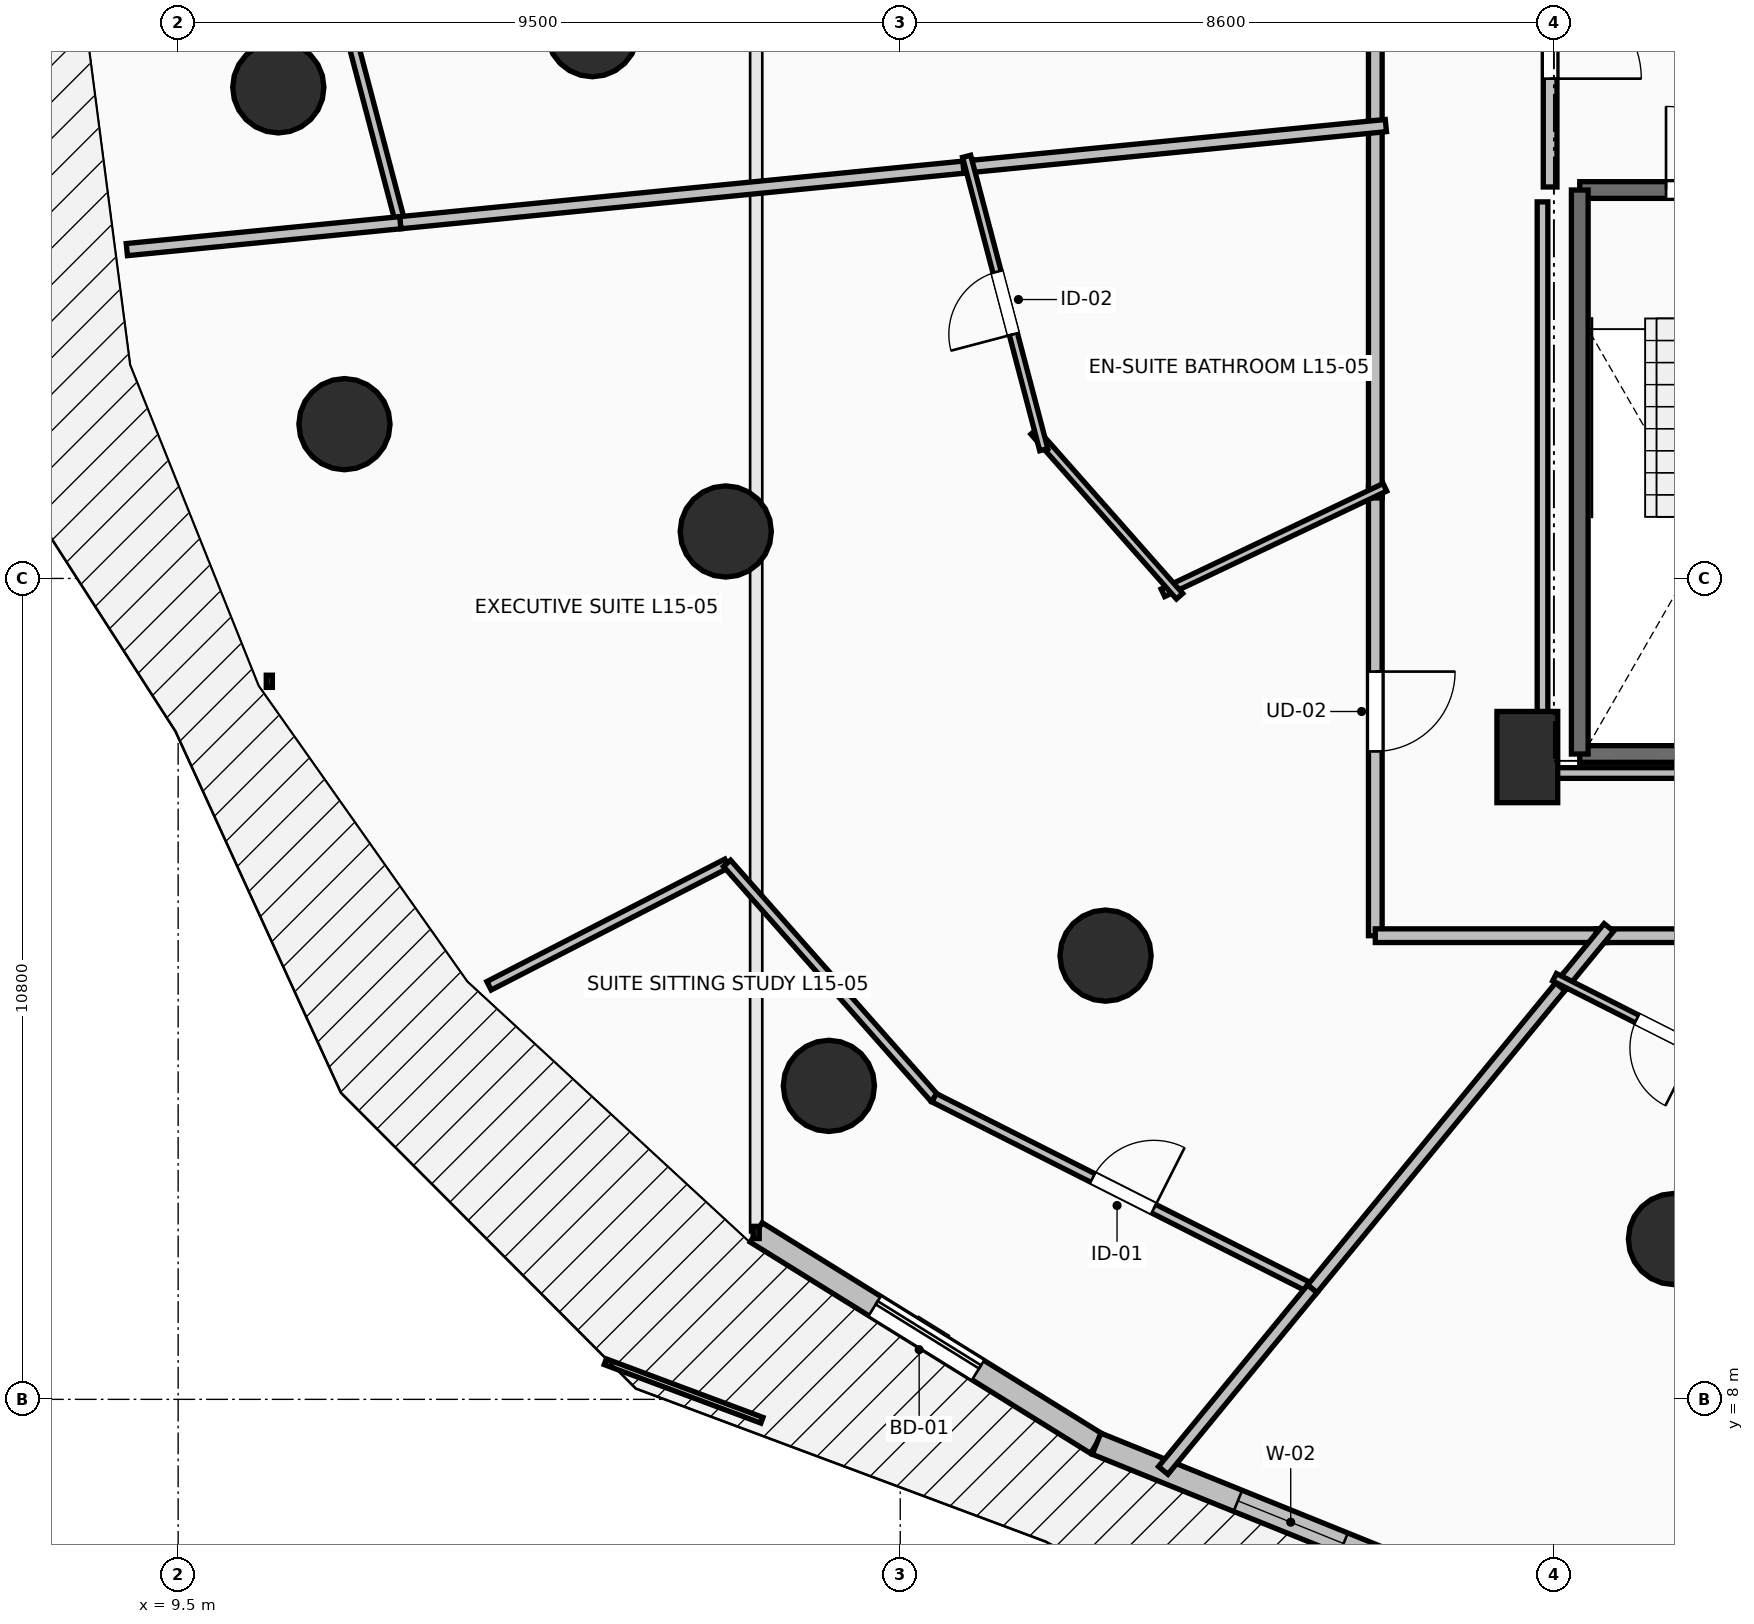
"""IFC4 building model, lengths in metres.
Left out: names, types, materials, properties, quantities, classifications, styles, units other than length and angle.
Written with IfcOpenShell. Run it as: python <this file> out.ifc"""

import sys

from ifc_helpers import new_model, si_unit, direction, frame, frame_2d, origin, origin_2d, place, context, subcontext, project, spatial, rectangle, circle, extrude, element, fill, save


model = new_model("IFC4")
c1 = context("Model", 3, precision=1e-05, world=origin(), true_north=direction((0.0, 1.0)))
c2 = subcontext(c1, "Body", "Model", "MODEL_VIEW")
j1 = project(units=[si_unit("LENGTHUNIT", "METRE"), si_unit("PLANEANGLEUNIT", "RADIAN")], contexts=[c1])
p1 = place(None, origin())
s1 = spatial("IfcSite", under=j1, at=p1, CompositionType="ELEMENT")
p2 = place(p1, origin())
s2 = spatial("IfcBuilding", under=s1, at=p2, CompositionType="ELEMENT")
p3 = place(p2, frame((0.0, 0.0, 59.0)))
s3 = spatial("IfcBuildingStorey", under=s2, at=p3, CompositionType="ELEMENT", Elevation=59.0)
for number, where, z_axis, x_axis in (
    (1, (14.95, 26.0, 0.0), (0.0, 0.0, 1.0), (-1.0, 0.0, 0.0)),
    (2, (16.705, 19.418, 0.0), (0.0, 0.0, 1.0), (-0.924, -0.383, 0.0)),
    (3, (21.701, 13.838, 0.0), (0.0, 0.0, 1.0), (-0.707, -0.707, 0.0)),
    (4, (29.179, 10.109, 0.0), (0.0, 0.0, 1.0), (-0.383, -0.924, 0.0)),
    (5, (10.818, 25.261, 0.0), (0.0, 0.0, 1.0), (-1.0, 0.0, 0.0)),
    (6, (11.688, 20.83, 0.0), (0.0, 0.0, 1.0), (-0.924, -0.383, 0.0)),
    (7, (18.061, 12.124, 0.0), (0.0, 0.0, 1.0), (-0.707, -0.707, 0.0)),
):
    element("IfcColumn", number, at=place(p3, frame(where, z_axis=z_axis, x_axis=x_axis)), inside=s3, PredefinedType="COLUMN", context=c2, shape_type="SweptSolid", body=[
        extrude(circle(Radius=0.6, at=origin_2d()), origin(), (0.0, 0.0, 1.0), 3.5),
    ])
p4 = place(p3, frame((27.25, 16.45, 0.0), z_axis=(0.0, 0.0, 1.0), x_axis=(1.0, 0.0, 0.0)))
e8 = element("IfcColumn", 8, at=p4, inside=s3, PredefinedType="PILASTER", context=c2, shape_type="SweptSolid", body=[
    extrude(rectangle(XDim=0.8, YDim=1.2, at=origin_2d()), origin(), (0.0, 0.0, 1.0), 3.5),
])
p5 = place(p3, frame((17.105, 10.196, 0.0), z_axis=(0.0, 0.0, 1.0), x_axis=(0.849633724826, -0.527373239404, 0.0)))
e9 = element("IfcWall", 9, at=p5, inside=s3, PredefinedType="STANDARD", context=c2, shape_type="SweptSolid", body=[
    extrude(rectangle(XDim=5.271, YDim=0.3, at=frame_2d((2.635, 0.0))), origin(), (0.0, 0.0, 1.0), 3.24),
])
p6 = place(p5, frame((1.835, 0.0, 0.0)))
e10 = element("IfcOpeningElement", 10, at=p6, cuts=e9, PredefinedType="OPENING", context=c2, shape_type="SweptSolid", body=[
    extrude(rectangle(XDim=1.6, YDim=2.3, at=frame_2d((0.8, 1.15))), frame((0.0, 0.165, 0.0), z_axis=(0.0, -1.0, 0.0), x_axis=(1.0, 0.0, 0.0)), (0.0, 0.0, 1.0), 0.33),
])
p7 = place(p3, frame((21.583, 7.417, 0.0), z_axis=(0.0, 0.0, 1.0), x_axis=(0.927095325176, -0.374825636845, 0.0)))
e11 = element("IfcWall", 11, at=p7, inside=s3, PredefinedType="STANDARD", context=c2, shape_type="SweptSolid", body=[
    extrude(rectangle(XDim=5.51, YDim=0.3, at=frame_2d((2.755, 0.0))), origin(), (0.0, 0.0, 1.0), 3.24),
])
p8 = place(p7, frame((2.005, 0.0, 0.85)))
e12 = element("IfcOpeningElement", 12, at=p8, cuts=e11, PredefinedType="OPENING", context=c2, shape_type="SweptSolid", body=[
    extrude(rectangle(XDim=1.5, YDim=2.19, at=frame_2d((0.75, 1.095))), frame((0.0, 0.165, 0.0), z_axis=(0.0, -1.0, 0.0), x_axis=(1.0, 0.0, 0.0)), (0.0, 0.0, 1.0), 0.33),
])
p9 = place(p3, frame((27.94, 23.91, 0.0), z_axis=(0.0, 0.0, 1.0), x_axis=(1.0, 0.0, 0.0)))
e13 = element("IfcWall", 13, at=p9, inside=s3, PredefinedType="SOLIDWALL", context=c2, shape_type="SweptSolid", body=[
    extrude(rectangle(XDim=3.37, YDim=0.22, at=frame_2d((1.685, 0.0))), origin(), (0.0, 0.0, 1.0), 3.24),
])
p10 = place(p9, frame((1.135, 0.0, 0.0)))
e14 = element("IfcOpeningElement", 14, at=p10, cuts=e13, PredefinedType="OPENING", context=c2, shape_type="SweptSolid", body=[
    extrude(rectangle(XDim=1.1, YDim=2.15, at=frame_2d((0.55, 1.075))), frame((0.0, 0.125, 0.0), z_axis=(0.0, -1.0, 0.0), x_axis=(1.0, 0.0, 0.0)), (0.0, 0.0, 1.0), 0.25),
])
p11 = place(p3, frame((31.31, 16.49, 0.0), z_axis=(0.0, 0.0, 1.0), x_axis=(-1.0, 0.0, 0.0)))
e15 = element("IfcWall", 15, at=p11, inside=s3, PredefinedType="SOLIDWALL", context=c2, shape_type="SweptSolid", body=[
    extrude(rectangle(XDim=3.37, YDim=0.22, at=frame_2d((1.685, 0.0))), origin(), (0.0, 0.0, 1.0), 3.24),
])
p12 = place(p3, frame((27.94, 16.49, 0.0), z_axis=(0.0, 0.0, 1.0), x_axis=(0.0, 1.0, 0.0)))
e16 = element("IfcWall", 16, at=p12, inside=s3, PredefinedType="SOLIDWALL", context=c2, shape_type="SweptSolid", body=[
    extrude(rectangle(XDim=7.42, YDim=0.22, at=frame_2d((3.71, 0.0))), origin(), (0.0, 0.0, 1.0), 3.24),
])
p13 = place(p3, frame((27.55, 28.0, 0.0), z_axis=(0.0, 0.0, 1.0), x_axis=(0.0, -1.0, 0.0)))
e17 = element("IfcWall", 17, at=p13, inside=s3, PredefinedType="PARTITIONING", context=c2, shape_type="SweptSolid", body=[
    extrude(rectangle(XDim=4.05, YDim=0.18, at=frame_2d((2.025, 0.0))), origin(), (0.0, 0.0, 1.0), 3.24),
])
p14 = place(p13, frame((1.425, 0.0, 0.0)))
e18 = element("IfcOpeningElement", 18, at=p14, cuts=e17, PredefinedType="OPENING", context=c2, shape_type="SweptSolid", body=[
    extrude(rectangle(XDim=1.2, YDim=2.15, at=frame_2d((0.6, 1.075))), frame((0.0, 0.105, 0.0), z_axis=(0.0, -1.0, 0.0), x_axis=(1.0, 0.0, 0.0)), (0.0, 0.0, 1.0), 0.21),
])
p15 = place(p3, frame((25.25, 30.598, 0.0), z_axis=(0.0, 0.0, 1.0), x_axis=(0.0, -1.0, 0.0)))
e19 = element("IfcWall", 19, at=p15, inside=s3, PredefinedType="PARTITIONING", context=c2, shape_type="SweptSolid", body=[
    extrude(rectangle(XDim=5.914, YDim=0.18, at=frame_2d((2.957, 0.0))), origin(), (0.0, 0.0, 1.0), 2.432),
])
p16 = place(p15, frame((2.432, 0.0, 0.0)))
e20 = element("IfcOpeningElement", 20, at=p16, cuts=e19, PredefinedType="OPENING", context=c2, shape_type="SweptSolid", body=[
    extrude(rectangle(XDim=1.05, YDim=2.2, at=frame_2d((0.525, 1.1))), frame((0.0, 0.105, 0.0), z_axis=(0.0, -1.0, 0.0), x_axis=(1.0, 0.0, 0.0)), (0.0, 0.0, 1.0), 0.21),
])
p17 = place(p3, frame((25.25, 19.999, 0.0), z_axis=(0.0, 0.0, 1.0), x_axis=(0.0, -1.0, 0.0)))
e21 = element("IfcWall", 21, at=p17, inside=s3, PredefinedType="PARTITIONING", context=c2, shape_type="SweptSolid", body=[
    extrude(rectangle(XDim=5.899, YDim=0.18, at=frame_2d((2.949, 0.0))), origin(), (0.0, 0.0, 1.0), 2.432),
])
p18 = place(p17, frame((2.425, 0.0, 0.0)))
e22 = element("IfcOpeningElement", 22, at=p18, cuts=e21, PredefinedType="OPENING", context=c2, shape_type="SweptSolid", body=[
    extrude(rectangle(XDim=1.05, YDim=2.2, at=frame_2d((0.525, 1.1))), frame((0.0, 0.105, 0.0), z_axis=(0.0, -1.0, 0.0), x_axis=(1.0, 0.0, 0.0)), (0.0, 0.0, 1.0), 0.21),
])
p19 = place(p3, frame((25.25, 14.1, 0.0), z_axis=(0.0, 0.0, 1.0), x_axis=(1.0, 0.0, 0.0)))
e23 = element("IfcWall", 23, at=p19, inside=s3, PredefinedType="PARTITIONING", context=c2, shape_type="SweptSolid", body=[
    extrude(rectangle(XDim=3.044, YDim=0.18, at=frame_2d((1.522, 0.0))), origin(), (0.0, 0.0, 1.0), 2.432),
])
p20 = place(p3, frame((25.25, 24.824, 0.0), z_axis=(0.0, 0.0, 1.0), x_axis=(0.0, -1.0, 0.0)))
e24 = element("IfcWall", 24, at=p20, inside=s3, PredefinedType="PARTITIONING", context=c2, shape_type="SweptSolid", body=[
    extrude(rectangle(XDim=4.965, YDim=0.18, at=frame_2d((2.482, 0.0))), origin(), (0.0, 0.0, 1.0), 3.24),
])
p21 = place(p3, frame((28.154, 14.1, 0.0), z_axis=(0.0, 0.0, 1.0), x_axis=(1.0, 0.0, 0.0)))
e25 = element("IfcWall", 25, at=p21, inside=s3, PredefinedType="PARTITIONING", context=c2, shape_type="SweptSolid", body=[
    extrude(rectangle(XDim=5.69, YDim=0.18, at=frame_2d((2.845, 0.0))), origin(), (0.0, 0.0, 1.0), 2.432),
])
p22 = place(p3, frame((11.76, 26.0, 0.0), z_axis=(0.0, 0.0, 1.0), x_axis=(0.254465628682, -0.967081818576, 0.0)))
e26 = element("IfcWall", 26, at=p22, inside=s3, PredefinedType="PARTITIONING", context=c2, shape_type="SweptSolid", body=[
    extrude(rectangle(XDim=2.606, YDim=0.125, at=frame_2d((1.303, 0.0))), origin(), (0.0, 0.0, 1.0), 2.432),
])
p23 = place(p3, frame((12.423, 23.48, 0.0), z_axis=(0.0, 0.0, 1.0), x_axis=(0.995173937517, 0.098126622721, 0.0)))
e27 = element("IfcWall", 27, at=p23, inside=s3, PredefinedType="PARTITIONING", context=c2, shape_type="SweptSolid", body=[
    extrude(rectangle(XDim=7.583, YDim=0.16, at=frame_2d((3.792, 0.0))), origin(), (0.0, 0.0, 1.0), 2.886),
])
p24 = place(p3, frame((19.831, 24.21, 0.0), z_axis=(0.0, 0.0, 1.0), x_axis=(0.995182391057, 0.098040851333, 0.0)))
e28 = element("IfcWall", 28, at=p24, inside=s3, PredefinedType="PARTITIONING", context=c2, shape_type="SweptSolid", body=[
    extrude(rectangle(XDim=5.585, YDim=0.16, at=frame_2d((2.793, 0.0))), origin(), (0.0, 0.0, 1.0), 2.929),
])
p25 = place(p3, frame((8.825, 23.126, 0.0), z_axis=(0.0, 0.0, 1.0), x_axis=(0.995195038103, 0.097912390097, 0.0)))
e29 = element("IfcWall", 29, at=p25, inside=s3, PredefinedType="PARTITIONING", context=c2, shape_type="SweptSolid", body=[
    extrude(rectangle(XDim=3.615, YDim=0.16, at=frame_2d((1.808, 0.0))), origin(), (0.0, 0.0, 1.0), 2.624),
])
p26 = place(p3, frame((25.376, 19.999, 0.0), z_axis=(0.0, 0.0, 1.0), x_axis=(-0.903186785932, -0.429247748647, 0.0)))
e30 = element("IfcWall", 30, at=p26, inside=s3, PredefinedType="PARTITIONING", context=c2, shape_type="SweptSolid", body=[
    extrude(rectangle(XDim=3.234, YDim=0.11, at=frame_2d((1.617, 0.0))), origin(), (0.0, 0.0, 1.0), 2.929),
])
p27 = place(p3, frame((22.675, 18.566, 0.0), z_axis=(0.0, 0.0, 1.0), x_axis=(-0.661981720099, 0.749519981224, 0.0)))
e31 = element("IfcWall", 31, at=p27, inside=s3, PredefinedType="PARTITIONING", context=c2, shape_type="SweptSolid", body=[
    extrude(rectangle(XDim=2.892, YDim=0.11, at=frame_2d((1.446, 0.0))), origin(), (0.0, 0.0, 1.0), 2.929),
])
p28 = place(p3, frame((20.889, 20.494, 0.0), z_axis=(0.0, 0.0, 1.0), x_axis=(-0.254405980461, 0.967097511684, 0.0)))
e32 = element("IfcWall", 32, at=p28, inside=s3, PredefinedType="PARTITIONING", context=c2, shape_type="SweptSolid", body=[
    extrude(rectangle(XDim=3.991, YDim=0.11, at=frame_2d((1.996, 0.0))), origin(), (0.0, 0.0, 1.0), 3.24),
])
p29 = place(p28, frame((1.571, 0.0, 0.0)))
e33 = element("IfcOpeningElement", 33, at=p29, cuts=e32, PredefinedType="OPENING", context=c2, shape_type="SweptSolid", body=[
    extrude(rectangle(XDim=0.85, YDim=2.1, at=frame_2d((0.425, 1.05))), frame((0.0, 0.07, 0.0), z_axis=(0.0, -1.0, 0.0), x_axis=(1.0, 0.0, 0.0)), (0.0, 0.0, 1.0), 0.14),
])
p30 = place(p3, frame((13.59, 13.441, 0.0), z_axis=(0.0, 0.0, 1.0), x_axis=(0.889180616302, 0.457556369852, 0.0)))
e34 = element("IfcWall", 34, at=p30, inside=s3, PredefinedType="PARTITIONING", context=c2, shape_type="SweptSolid", body=[
    extrude(rectangle(XDim=3.521, YDim=0.125, at=frame_2d((1.76, 0.0))), origin(), (0.0, 0.0, 1.0), 2.624),
])
p31 = place(p3, frame((16.721, 15.052, 0.0), z_axis=(0.0, 0.0, 1.0), x_axis=(0.662159063844, -0.749363312532, 0.0)))
e35 = element("IfcWall", 35, at=p31, inside=s3, PredefinedType="PARTITIONING", context=c2, shape_type="SweptSolid", body=[
    extrude(rectangle(XDim=4.115, YDim=0.125, at=frame_2d((2.058, 0.0))), origin(), (0.0, 0.0, 1.0), 2.432),
])
p32 = place(p3, frame((19.446, 11.968, 0.0), z_axis=(0.0, 0.0, 1.0), x_axis=(0.892518178955, -0.451011419184, 0.0)))
e36 = element("IfcWall", 36, at=p32, inside=s3, PredefinedType="PARTITIONING", context=c2, shape_type="SweptSolid", body=[
    extrude(rectangle(XDim=5.574, YDim=0.125, at=frame_2d((2.787, 0.0))), origin(), (0.0, 0.0, 1.0), 3.24),
])
p33 = place(p32, frame((2.337, 0.0, 0.0)))
e37 = element("IfcOpeningElement", 37, at=p33, cuts=e36, PredefinedType="OPENING", context=c2, shape_type="SweptSolid", body=[
    extrude(rectangle(XDim=0.9, YDim=2.1, at=frame_2d((0.45, 1.05))), frame((0.0, 0.077, 0.0), z_axis=(0.0, -1.0, 0.0), x_axis=(1.0, 0.0, 0.0)), (0.0, 0.0, 1.0), 0.155),
])
p34 = place(p3, frame((24.421, 9.454, 0.0), z_axis=(0.0, 0.0, 1.0), x_axis=(0.634420016008, 0.772988514332, 0.0)))
e38 = element("IfcWall", 38, at=p34, inside=s3, PredefinedType="PARTITIONING", context=c2, shape_type="SweptSolid", body=[
    extrude(rectangle(XDim=5.282, YDim=0.16, at=frame_2d((2.641, 0.0))), origin(), (0.0, 0.0, 1.0), 2.886),
])
p35 = place(p3, frame((27.683, 13.429, 0.0), z_axis=(0.0, 0.0, 1.0), x_axis=(0.634186727441, 0.77317992391, 0.0)))
e39 = element("IfcWall", 39, at=p35, inside=s3, PredefinedType="PARTITIONING", context=c2, shape_type="SweptSolid", body=[
    extrude(rectangle(XDim=1.008, YDim=0.16, at=frame_2d((0.504, 0.0))), origin(), (0.0, 0.0, 1.0), 2.432),
])
p36 = place(p3, frame((22.46, 7.065, 0.0), z_axis=(0.0, 0.0, 1.0), x_axis=(0.634432805544, 0.772978017313, 0.0)))
e40 = element("IfcWall", 40, at=p36, inside=s3, PredefinedType="PARTITIONING", context=c2, shape_type="SweptSolid", body=[
    extrude(rectangle(XDim=3.091, YDim=0.16, at=frame_2d((1.545, 0.0))), origin(), (0.0, 0.0, 1.0), 2.624),
])
p37 = place(p3, frame((30.533, 12.075, 0.0), z_axis=(0.0, 0.0, 1.0), x_axis=(-0.892451870397, 0.451142614952, 0.0)))
e41 = element("IfcWall", 41, at=p37, inside=s3, PredefinedType="PARTITIONING", context=c2, shape_type="SweptSolid", body=[
    extrude(rectangle(XDim=3.277, YDim=0.11, at=frame_2d((1.639, 0.0))), origin(), (0.0, 0.0, 1.0), 2.432),
])
p38 = place(p37, frame((1.214, 0.0, 0.0)))
e42 = element("IfcOpeningElement", 42, at=p38, cuts=e41, PredefinedType="OPENING", context=c2, shape_type="SweptSolid", body=[
    extrude(rectangle(XDim=0.85, YDim=2.1, at=frame_2d((0.425, 1.05))), frame((0.0, 0.07, 0.0), z_axis=(0.0, -1.0, 0.0), x_axis=(1.0, 0.0, 0.0)), (0.0, 0.0, 1.0), 0.14),
])
p39 = place(p3, frame((31.195, 16.24, 0.0), z_axis=(0.0, 0.0, 1.0), x_axis=(-1.0, 0.0, 0.0)))
e43 = element("IfcWall", 43, at=p39, inside=s3, PredefinedType="PARTITIONING", context=c2, shape_type="SweptSolid", body=[
    extrude(rectangle(XDim=3.745, YDim=0.14, at=frame_2d((1.873, 0.0))), origin(), (0.0, 0.0, 1.0), 2.432),
])
p40 = place(p3, frame((27.45, 16.24, 0.0), z_axis=(0.0, 0.0, 1.0), x_axis=(0.0, 1.0, 0.0)))
e44 = element("IfcWall", 44, at=p40, inside=s3, PredefinedType="PARTITIONING", context=c2, shape_type="SweptSolid", body=[
    extrude(rectangle(XDim=7.514, YDim=0.14, at=frame_2d((3.757, 0.0))), origin(), (0.0, 0.0, 1.0), 2.432),
])
p41 = place(p6, origin())
e45 = element("IfcDoor", 45, at=p41, inside=s3, OperationType="SLIDING_TO_LEFT", PredefinedType="DOOR", context=c2, shape_type="SweptSolid", body=[
    extrude(rectangle(XDim=1.6, YDim=2.3, at=frame_2d((0.8, 1.15))), frame((0.0, 0.025, 0.0), z_axis=(0.0, -1.0, 0.0), x_axis=(1.0, 0.0, 0.0)), (0.0, 0.0, 1.0), 0.05),
])
fill(e10, e45)
p42 = place(p8, origin())
e46 = element("IfcWindow", 46, at=p42, inside=s3, PartitioningType="SINGLE_PANEL", PredefinedType="WINDOW", context=c2, shape_type="SweptSolid", body=[
    extrude(rectangle(XDim=1.5, YDim=2.19, at=frame_2d((0.75, 1.095))), frame((0.0, 0.03, 0.0), z_axis=(0.0, -1.0, 0.0), x_axis=(1.0, 0.0, 0.0)), (0.0, 0.0, 1.0), 0.06),
])
fill(e12, e46)
p43 = place(p10, origin())
e47 = element("IfcDoor", 47, at=p43, inside=s3, OperationType="SINGLE_SWING_LEFT", PredefinedType="DOOR", context=c2, shape_type="SweptSolid", body=[
    extrude(rectangle(XDim=1.1, YDim=2.15, at=frame_2d((0.55, 1.075))), frame((0.0, 0.025, 0.0), z_axis=(0.0, -1.0, 0.0), x_axis=(1.0, 0.0, 0.0)), (0.0, 0.0, 1.0), 0.05),
])
fill(e14, e47)
p44 = place(p14, origin())
e48 = element("IfcDoor", 48, at=p44, inside=s3, OperationType="SINGLE_SWING_RIGHT", PredefinedType="DOOR", context=c2, shape_type="SweptSolid", body=[
    extrude(rectangle(XDim=1.2, YDim=2.15, at=frame_2d((0.6, 1.075))), frame((0.0, 0.025, 0.0), z_axis=(0.0, -1.0, 0.0), x_axis=(1.0, 0.0, 0.0)), (0.0, 0.0, 1.0), 0.05),
])
fill(e18, e48)
p45 = place(p18, origin())
e49 = element("IfcDoor", 49, at=p45, inside=s3, OperationType="SINGLE_SWING_LEFT", PredefinedType="DOOR", context=c2, shape_type="SweptSolid", body=[
    extrude(rectangle(XDim=1.05, YDim=2.2, at=frame_2d((0.525, 1.1))), frame((0.0, 0.025, 0.0), z_axis=(0.0, -1.0, 0.0), x_axis=(1.0, 0.0, 0.0)), (0.0, 0.0, 1.0), 0.05),
])
fill(e22, e49)
p46 = place(p29, origin())
e50 = element("IfcDoor", 50, at=p46, inside=s3, OperationType="SINGLE_SWING_LEFT", PredefinedType="DOOR", context=c2, shape_type="SweptSolid", body=[
    extrude(rectangle(XDim=0.85, YDim=2.1, at=frame_2d((0.425, 1.05))), frame((0.0, 0.025, 0.0), z_axis=(0.0, -1.0, 0.0), x_axis=(1.0, 0.0, 0.0)), (0.0, 0.0, 1.0), 0.05),
])
fill(e33, e50)
p47 = place(p33, origin())
e51 = element("IfcDoor", 51, at=p47, inside=s3, OperationType="SINGLE_SWING_RIGHT", PredefinedType="DOOR", context=c2, shape_type="SweptSolid", body=[
    extrude(rectangle(XDim=0.9, YDim=2.1, at=frame_2d((0.45, 1.05))), frame((0.0, 0.025, 0.0), z_axis=(0.0, -1.0, 0.0), x_axis=(1.0, 0.0, 0.0)), (0.0, 0.0, 1.0), 0.05),
])
fill(e37, e51)
p48 = place(p38, origin())
e52 = element("IfcDoor", 52, at=p48, inside=s3, OperationType="SINGLE_SWING_LEFT", PredefinedType="DOOR", context=c2, shape_type="SweptSolid", body=[
    extrude(rectangle(XDim=0.85, YDim=2.1, at=frame_2d((0.425, 1.05))), frame((0.0, 0.025, 0.0), z_axis=(0.0, -1.0, 0.0), x_axis=(1.0, 0.0, 0.0)), (0.0, 0.0, 1.0), 0.05),
])
fill(e42, e52)
save(model, sys.argv[1])
